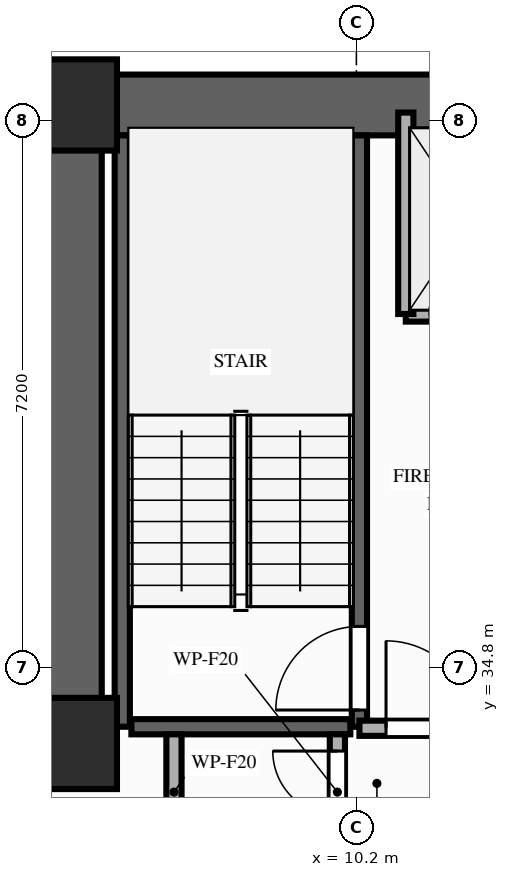
"""IFC4 building model, lengths in metres.
Left out: names, types, materials, properties, quantities, classifications, styles, units other than length and angle.
Written with IfcOpenShell. Run it as: python <this file> out.ifc"""

import sys

from ifc_helpers import new_model, si_unit, direction, frame, frame_2d, origin, origin_2d, place, context, subcontext, project, spatial, rectangle, extrude, element, fill, save


model = new_model("IFC4")
c1 = context("Model", 3, precision=1e-05, world=origin(), true_north=direction((0.0, 1.0)))
c2 = subcontext(c1, "Body", "Model", "MODEL_VIEW")
j1 = project(units=[si_unit("LENGTHUNIT", "METRE"), si_unit("PLANEANGLEUNIT", "RADIAN")], contexts=[c1])
p1 = place(None, origin())
s1 = spatial("IfcSite", under=j1, at=p1, CompositionType="ELEMENT")
p2 = place(p1, origin())
s2 = spatial("IfcBuilding", under=s1, at=p2, CompositionType="ELEMENT")
p3 = place(p2, frame((0.0, 0.0, 30.2)))
s3 = spatial("IfcBuildingStorey", under=s2, at=p3, CompositionType="ELEMENT", Elevation=30.2)
for number, where, z_axis, x_axis in (
    (1, (6.45, 33.8, 0.0), (0.0, 0.0, 1.0), (1.0, 0.0, 0.0)),
    (2, (6.45, 42.2, 0.0), (0.0, 0.0, 1.0), (1.0, 0.0, 0.0)),
):
    element("IfcColumn", number, at=place(p3, frame(where, z_axis=z_axis, x_axis=x_axis)), inside=s3, PredefinedType="COLUMN", context=c2, shape_type="SweptSolid", body=[
        extrude(rectangle(XDim=1.2, YDim=1.2, at=origin_2d()), origin(), (0.0, 0.0, 1.0), 3.2),
    ])
p4 = place(p3, frame((6.45, 42.2, 0.0), z_axis=(0.0, 0.0, 1.0), x_axis=(1.0, 0.0, 0.0)))
e3 = element("IfcWall", 3, at=p4, inside=s3, PredefinedType="SHEAR", context=c2, shape_type="SweptSolid", body=[
    extrude(rectangle(XDim=20.45, YDim=0.8, at=frame_2d((10.225, 0.0))), origin(), (0.0, 0.0, 1.0), 3.02),
])
p5 = place(p3, frame((6.45, 33.8, 0.0), z_axis=(0.0, 0.0, 1.0), x_axis=(0.0, 1.0, 0.0)))
e4 = element("IfcWall", 4, at=p5, inside=s3, PredefinedType="SHEAR", context=c2, shape_type="SweptSolid", body=[
    extrude(rectangle(XDim=7.95, YDim=0.8, at=frame_2d((3.975, 0.0))), origin(), (0.0, 0.0, 1.0), 3.02),
])
p6 = place(p3, frame((7.12, 34.02, 0.0), z_axis=(0.0, 0.0, 1.0), x_axis=(0.0, 1.0, 0.0)))
e5 = element("IfcWall", 5, at=p6, inside=s3, PredefinedType="SHEAR", context=c2, shape_type="SweptSolid", body=[
    extrude(rectangle(XDim=7.78, YDim=0.2, at=frame_2d((3.89, 0.0))), origin(), (0.0, 0.0, 1.0), 3.02),
])
p7 = place(p3, frame((10.24, 34.02, 0.0), z_axis=(0.0, 0.0, 1.0), x_axis=(0.0, 1.0, 0.0)))
e6 = element("IfcWall", 6, at=p7, inside=s3, PredefinedType="SHEAR", context=c2, shape_type="SweptSolid", body=[
    extrude(rectangle(XDim=7.78, YDim=0.2, at=frame_2d((3.89, 0.0))), origin(), (0.0, 0.0, 1.0), 3.02),
])
p8 = place(p7, frame((0.22, 0.0, 0.0)))
e7 = element("IfcOpeningElement", 7, at=p8, cuts=e6, PredefinedType="OPENING", context=c2, shape_type="SweptSolid", body=[
    extrude(rectangle(XDim=1.1, YDim=2.15, at=frame_2d((0.55, 1.075))), frame((0.0, 0.11, 0.0), z_axis=(0.0, -1.0, 0.0), x_axis=(1.0, 0.0, 0.0)), (0.0, 0.0, 1.0), 0.22),
])
p9 = place(p3, frame((7.24, 34.02, 0.0), z_axis=(0.0, 0.0, 1.0), x_axis=(1.0, 0.0, 0.0)))
e8 = element("IfcWall", 8, at=p9, inside=s3, PredefinedType="SHEAR", context=c2, shape_type="SweptSolid", body=[
    extrude(rectangle(XDim=2.88, YDim=0.2, at=frame_2d((1.44, 0.0))), origin(), (0.0, 0.0, 1.0), 3.02),
])
p10 = place(p3, frame((10.85, 39.45, 0.0), z_axis=(0.0, 0.0, 1.0), x_axis=(1.0, 0.0, 0.0)))
e9 = element("IfcWall", 9, at=p10, inside=s3, PredefinedType="MOVABLE", context=c2, shape_type="SweptSolid", body=[
    extrude(rectangle(XDim=1.7, YDim=0.2, at=frame_2d((0.85, 0.0))), origin(), (0.0, 0.0, 1.0), 3.02),
])
p11 = place(p10, frame((0.32, 0.0, 0.0)))
e10 = element("IfcOpeningElement", 10, at=p11, cuts=e9, PredefinedType="OPENING", context=c2, shape_type="SweptSolid", body=[
    extrude(rectangle(XDim=1.05, YDim=2.15, at=frame_2d((0.525, 1.075))), frame((0.0, 0.11, 0.0), z_axis=(0.0, -1.0, 0.0), x_axis=(1.0, 0.0, 0.0)), (0.0, 0.0, 1.0), 0.22),
])
p12 = place(p3, frame((10.85, 39.45, 0.0), z_axis=(0.0, 0.0, 1.0), x_axis=(0.0, 1.0, 0.0)))
e11 = element("IfcWall", 11, at=p12, inside=s3, PredefinedType="MOVABLE", context=c2, shape_type="SweptSolid", body=[
    extrude(rectangle(XDim=2.65, YDim=0.2, at=frame_2d((1.325, 0.0))), origin(), (0.0, 0.0, 1.0), 2.41),
])
p13 = place(p3, frame((10.24, 34.0, 0.0), z_axis=(0.0, 0.0, 1.0), x_axis=(1.0, 0.0, 0.0)))
e12 = element("IfcWall", 12, at=p13, inside=s3, PredefinedType="PARTITIONING", context=c2, shape_type="SweptSolid", body=[
    extrude(rectangle(XDim=2.66, YDim=0.2, at=frame_2d((1.33, 0.0))), origin(), (0.0, 0.0, 1.0), 2.41),
])
p14 = place(p13, frame((0.35, 0.0, 0.0)))
e13 = element("IfcOpeningElement", 13, at=p14, cuts=e12, PredefinedType="OPENING", context=c2, shape_type="SweptSolid", body=[
    extrude(rectangle(XDim=1.15, YDim=2.15, at=frame_2d((0.575, 1.075))), frame((0.0, 0.11, 0.0), z_axis=(0.0, -1.0, 0.0), x_axis=(1.0, 0.0, 0.0)), (0.0, 0.0, 1.0), 0.22),
])
p15 = place(p3, frame((7.8, 32.4, 0.0), z_axis=(0.0, 0.0, 1.0), x_axis=(0.0, 1.0, 0.0)))
e14 = element("IfcWall", 14, at=p15, inside=s3, PredefinedType="PARTITIONING", context=c2, shape_type="SweptSolid", body=[
    extrude(rectangle(XDim=1.52, YDim=0.2, at=frame_2d((0.76, 0.0))), origin(), (0.0, 0.0, 1.0), 2.41),
])
p16 = place(p3, frame((9.95, 32.4, 0.0), z_axis=(0.0, 0.0, 1.0), x_axis=(0.0, 1.0, 0.0)))
e15 = element("IfcWall", 15, at=p16, inside=s3, PredefinedType="PARTITIONING", context=c2, shape_type="SweptSolid", body=[
    extrude(rectangle(XDim=1.52, YDim=0.2, at=frame_2d((0.76, 0.0))), origin(), (0.0, 0.0, 1.0), 2.41),
])
p17 = place(p16, frame((0.45, 0.0, 0.0)))
e16 = element("IfcOpeningElement", 16, at=p17, cuts=e15, PredefinedType="OPENING", context=c2, shape_type="SweptSolid", body=[
    extrude(rectangle(XDim=0.85, YDim=2.05, at=frame_2d((0.425, 1.025))), frame((0.0, 0.11, 0.0), z_axis=(0.0, -1.0, 0.0), x_axis=(1.0, 0.0, 0.0)), (0.0, 0.0, 1.0), 0.22),
])
p18 = place(p8, origin())
e17 = element("IfcDoor", 17, at=p18, inside=s3, OperationType="SINGLE_SWING_LEFT", PredefinedType="DOOR", context=c2, shape_type="SweptSolid", body=[
    extrude(rectangle(XDim=1.1, YDim=2.15, at=frame_2d((0.55, 1.075))), frame((0.0, 0.025, 0.0), z_axis=(0.0, -1.0, 0.0), x_axis=(1.0, 0.0, 0.0)), (0.0, 0.0, 1.0), 0.05),
])
fill(e7, e17)
p19 = place(p14, origin())
e18 = element("IfcDoor", 18, at=p19, inside=s3, OperationType="SINGLE_SWING_LEFT", PredefinedType="DOOR", context=c2, shape_type="SweptSolid", body=[
    extrude(rectangle(XDim=1.15, YDim=2.15, at=frame_2d((0.575, 1.075))), frame((0.0, 0.025, 0.0), z_axis=(0.0, -1.0, 0.0), x_axis=(1.0, 0.0, 0.0)), (0.0, 0.0, 1.0), 0.05),
])
fill(e13, e18)
p20 = place(p17, origin())
e19 = element("IfcDoor", 19, at=p20, inside=s3, OperationType="SINGLE_SWING_RIGHT", PredefinedType="DOOR", context=c2, shape_type="SweptSolid", body=[
    extrude(rectangle(XDim=0.85, YDim=2.05, at=frame_2d((0.425, 1.025))), frame((0.0, 0.025, 0.0), z_axis=(0.0, -1.0, 0.0), x_axis=(1.0, 0.0, 0.0)), (0.0, 0.0, 1.0), 0.05),
])
fill(e16, e19)
save(model, sys.argv[1])
